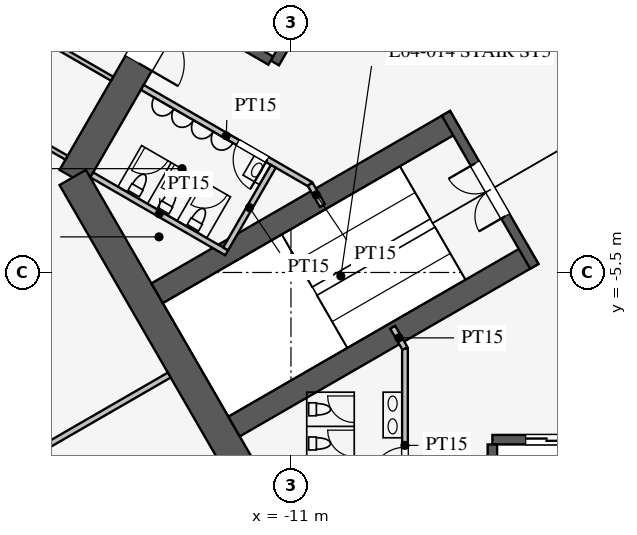
"""IFC4 building model, lengths in metres.
Left out: names, types, materials, properties, quantities, classifications, styles, units other than length and angle.
Written with IfcOpenShell. Run it as: python <this file> out.ifc"""

import sys

from ifc_helpers import new_model, si_unit, direction, frame, frame_2d, origin, place, context, subcontext, project, spatial, rectangle, extrude, element, fill, save


model = new_model("IFC4")
c1 = context("Model", 3, precision=1e-05, world=origin(), true_north=direction((0.0, 1.0)))
c2 = subcontext(c1, "Body", "Model", "MODEL_VIEW")
j1 = project(units=[si_unit("LENGTHUNIT", "METRE"), si_unit("PLANEANGLEUNIT", "RADIAN")], contexts=[c1])
p1 = place(None, origin())
s1 = spatial("IfcSite", under=j1, at=p1, CompositionType="ELEMENT")
p2 = place(p1, origin())
s2 = spatial("IfcBuilding", under=s1, at=p2, CompositionType="ELEMENT")
p3 = place(p2, frame((0.0, 0.0, 20.7)))
s3 = spatial("IfcBuildingStorey", under=s2, at=p3, CompositionType="ELEMENT", Elevation=20.7)
p4 = place(p3, frame((-5.773, 16.0, 0.0), z_axis=(0.0, 0.0, 1.0), x_axis=(-0.500002442456, -0.866023993627, 0.0)))
e1 = element("IfcWall", 1, at=p4, inside=s3, PredefinedType="SHEAR", context=c2, shape_type="SweptSolid", body=[
    extrude(rectangle(XDim=21.939, YDim=0.8, at=frame_2d((10.97, 0.0))), origin(), (0.0, 0.0, 1.0), 4.2),
])
p5 = place(p4, frame((17.27, 0.0, 0.0)))
e2 = element("IfcOpeningElement", 2, at=p5, cuts=e1, PredefinedType="OPENING", context=c2, shape_type="SweptSolid", body=[
    extrude(rectangle(XDim=1.2, YDim=2.1, at=frame_2d((0.6, 1.05))), frame((0.0, 0.41, 0.0), z_axis=(0.0, -1.0, 0.0), x_axis=(1.0, 0.0, 0.0)), (0.0, 0.0, 1.0), 0.82),
])
p6 = place(p4, frame((3.47, 0.0, 0.0)))
e3 = element("IfcOpeningElement", 3, at=p6, cuts=e1, PredefinedType="OPENING", context=c2, shape_type="SweptSolid", body=[
    extrude(rectangle(XDim=1.2, YDim=2.1, at=frame_2d((0.6, 1.05))), frame((0.0, 0.41, 0.0), z_axis=(0.0, -1.0, 0.0), x_axis=(1.0, 0.0, 0.0)), (0.0, 0.0, 1.0), 0.82),
])
p7 = place(p3, frame((-16.743, -3.0, 0.0), z_axis=(0.0, 0.0, 1.0), x_axis=(0.499995765644, -0.866027848477, 0.0)))
e4 = element("IfcWall", 4, at=p7, inside=s3, PredefinedType="SHEAR", context=c2, shape_type="SweptSolid", body=[
    extrude(rectangle(XDim=11.547, YDim=0.8, at=frame_2d((5.773, 0.0))), origin(), (0.0, 0.0, 1.0), 4.2),
])
p8 = place(p3, frame((-5.7, -9.9, 0.0), z_axis=(0.0, 0.0, 1.0), x_axis=(1.0, 0.0, 0.0)))
e5 = element("IfcWall", 5, at=p8, inside=s3, PredefinedType="SHEAR", context=c2, shape_type="SweptSolid", body=[
    extrude(rectangle(XDim=11.4, YDim=0.25, at=frame_2d((5.7, 0.0))), origin(), (0.0, 0.0, 1.0), 4.2),
])
p9 = place(p8, frame((0.875, 0.0, 0.0)))
e6 = element("IfcOpeningElement", 6, at=p9, cuts=e5, PredefinedType="OPENING", context=c2, shape_type="SweptSolid", body=[
    extrude(rectangle(XDim=1.1, YDim=2.2, at=frame_2d((0.55, 1.1))), frame((0.0, 0.135, 0.0), z_axis=(0.0, -1.0, 0.0), x_axis=(1.0, 0.0, 0.0)), (0.0, 0.0, 1.0), 0.27),
])
p10 = place(p8, frame((3.725, 0.0, 0.0)))
e7 = element("IfcOpeningElement", 7, at=p10, cuts=e5, PredefinedType="OPENING", context=c2, shape_type="SweptSolid", body=[
    extrude(rectangle(XDim=1.1, YDim=2.2, at=frame_2d((0.55, 1.1))), frame((0.0, 0.135, 0.0), z_axis=(0.0, -1.0, 0.0), x_axis=(1.0, 0.0, 0.0)), (0.0, 0.0, 1.0), 0.27),
])
p11 = place(p8, frame((6.575, 0.0, 0.0)))
e8 = element("IfcOpeningElement", 8, at=p11, cuts=e5, PredefinedType="OPENING", context=c2, shape_type="SweptSolid", body=[
    extrude(rectangle(XDim=1.1, YDim=2.2, at=frame_2d((0.55, 1.1))), frame((0.0, 0.135, 0.0), z_axis=(0.0, -1.0, 0.0), x_axis=(1.0, 0.0, 0.0)), (0.0, 0.0, 1.0), 0.27),
])
p12 = place(p8, frame((9.425, 0.0, 0.0)))
e9 = element("IfcOpeningElement", 9, at=p12, cuts=e5, PredefinedType="OPENING", context=c2, shape_type="SweptSolid", body=[
    extrude(rectangle(XDim=1.1, YDim=2.2, at=frame_2d((0.55, 1.1))), frame((0.0, 0.135, 0.0), z_axis=(0.0, -1.0, 0.0), x_axis=(1.0, 0.0, 0.0)), (0.0, 0.0, 1.0), 0.27),
])
p13 = place(p3, frame((-5.7, -10.025, 0.0), z_axis=(0.0, 0.0, 1.0), x_axis=(0.0, -1.0, 0.0)))
e10 = element("IfcWall", 10, at=p13, inside=s3, PredefinedType="SHEAR", context=c2, shape_type="SweptSolid", body=[
    extrude(rectangle(XDim=2.575, YDim=0.25, at=frame_2d((1.288, 0.0))), origin(), (0.0, 0.0, 1.0), 4.2),
])
p14 = place(p3, frame((-5.724, 9.886, 0.0), z_axis=(0.0, 0.0, 1.0), x_axis=(-0.500001763848, -0.866024385424, 0.0)))
e11 = element("IfcWall", 11, at=p14, inside=s3, PredefinedType="SHEAR", context=c2, shape_type="SweptSolid", body=[
    extrude(rectangle(XDim=11.4, YDim=0.25, at=frame_2d((5.7, 0.0))), origin(), (0.0, 0.0, 1.0), 4.2),
])
p15 = place(p14, frame((6.525, 0.0, 0.0)))
e12 = element("IfcOpeningElement", 12, at=p15, cuts=e11, PredefinedType="OPENING", context=c2, shape_type="SweptSolid", body=[
    extrude(rectangle(XDim=1.2, YDim=2.2, at=frame_2d((0.6, 1.1))), frame((0.0, 0.135, 0.0), z_axis=(0.0, -1.0, 0.0), x_axis=(1.0, 0.0, 0.0)), (0.0, 0.0, 1.0), 0.27),
])
p16 = place(p14, frame((9.375, 0.0, 0.0)))
e13 = element("IfcOpeningElement", 13, at=p16, cuts=e11, PredefinedType="OPENING", context=c2, shape_type="SweptSolid", body=[
    extrude(rectangle(XDim=1.2, YDim=2.2, at=frame_2d((0.6, 1.1))), frame((0.0, 0.135, 0.0), z_axis=(0.0, -1.0, 0.0), x_axis=(1.0, 0.0, 0.0)), (0.0, 0.0, 1.0), 0.27),
])
p17 = place(p3, frame((-11.532, 0.076, 0.0), z_axis=(0.0, 0.0, 1.0), x_axis=(-0.866005588531, 0.500034319456, 0.0)))
e14 = element("IfcWall", 14, at=p17, inside=s3, PredefinedType="SHEAR", context=c2, shape_type="SweptSolid", body=[
    extrude(rectangle(XDim=2.575, YDim=0.25, at=frame_2d((1.288, 0.0))), origin(), (0.0, 0.0, 1.0), 4.2),
])
for number, where, z_axis, x_axis in (
    (15, (-6.663, -1.509, 0.0), (0.0, 0.0, 1.0), (-0.866, -0.5, 0.0)),
    (16, (-4.638, -5.016, 0.0), (0.0, 0.0, 1.0), (-0.866, -0.5, 0.0)),
):
    element("IfcWall", number, at=place(p3, frame(where, z_axis=z_axis, x_axis=x_axis)), inside=s3, PredefinedType="SHEAR", context=c2, shape_type="SweptSolid", body=[
        extrude(rectangle(XDim=9.075, YDim=0.6, at=frame_2d((4.538, 0.0))), origin(), (0.0, 0.0, 1.0), 4.2),
    ])
p18 = place(p3, frame((-6.922, -1.312, 0.0), z_axis=(0.0, 0.0, 1.0), x_axis=(0.499984536904, -0.866034331223, 0.0)))
e17 = element("IfcWall", 17, at=p18, inside=s3, PredefinedType="SHEAR", context=c2, shape_type="SweptSolid", body=[
    extrude(rectangle(XDim=4.65, YDim=0.25, at=frame_2d((2.325, 0.0))), origin(), (0.0, 0.0, 1.0), 4.2),
])
p19 = place(p18, frame((1.525, 0.0, 0.0)))
e18 = element("IfcOpeningElement", 18, at=p19, cuts=e17, PredefinedType="OPENING", context=c2, shape_type="SweptSolid", body=[
    extrude(rectangle(XDim=1.6, YDim=2.1, at=frame_2d((0.8, 1.05))), frame((0.0, 0.135, 0.0), z_axis=(0.0, -1.0, 0.0), x_axis=(1.0, 0.0, 0.0)), (0.0, 0.0, 1.0), 0.27),
])
p20 = place(p3, frame((-8.0, -7.5, 0.0), z_axis=(0.0, 0.0, 1.0), x_axis=(0.0, -1.0, 0.0)))
e19 = element("IfcWall", 19, at=p20, inside=s3, PredefinedType="PARTITIONING", context=c2, shape_type="SweptSolid", body=[
    extrude(rectangle(XDim=5.1, YDim=0.15, at=frame_2d((2.55, 0.0))), origin(), (0.0, 0.0, 1.0), 4.0),
])
p21 = place(p20, frame((2.6, 0.0, 0.0)))
e20 = element("IfcOpeningElement", 20, at=p21, cuts=e19, PredefinedType="OPENING", context=c2, shape_type="SweptSolid", body=[
    extrude(rectangle(XDim=0.9, YDim=2.1, at=frame_2d((0.45, 1.05))), frame((0.0, 0.085, 0.0), z_axis=(0.0, -1.0, 0.0), x_axis=(1.0, 0.0, 0.0)), (0.0, 0.0, 1.0), 0.17),
])
p22 = place(p3, frame((-10.495, -3.178, 0.0), z_axis=(0.0, 0.0, 1.0), x_axis=(-0.86602216432, 0.500005610874, 0.0)))
e21 = element("IfcWall", 21, at=p22, inside=s3, PredefinedType="PARTITIONING", context=c2, shape_type="SweptSolid", body=[
    extrude(rectangle(XDim=5.1, YDim=0.15, at=frame_2d((2.55, 0.0))), origin(), (0.0, 0.0, 1.0), 4.0),
])
p23 = place(p22, frame((1.3, 0.0, 0.0)))
e22 = element("IfcOpeningElement", 22, at=p23, cuts=e21, PredefinedType="OPENING", context=c2, shape_type="SweptSolid", body=[
    extrude(rectangle(XDim=0.9, YDim=2.1, at=frame_2d((0.45, 1.05))), frame((0.0, 0.085, 0.0), z_axis=(0.0, -1.0, 0.0), x_axis=(1.0, 0.0, 0.0)), (0.0, 0.0, 1.0), 0.17),
])
for number, where, z_axis, x_axis in (
    (23, (-10.495, -3.178, 0.0), (0.0, 0.0, 1.0), (0.5, -0.866, 0.0)),
    (24, (-8.0, -7.5, 0.0), (0.0, 0.0, 1.0), (-0.5, 0.866, 0.0)),
):
    element("IfcWall", number, at=place(p3, frame(where, z_axis=z_axis, x_axis=x_axis)), inside=s3, PredefinedType="PARTITIONING", context=c2, shape_type="SweptSolid", body=[
        extrude(rectangle(XDim=0.645, YDim=0.15, at=frame_2d((0.323, 0.0))), origin(), (0.0, 0.0, 1.0), 4.0),
    ])
p24 = place(p3, frame((-12.691, -4.982, 0.0), z_axis=(0.0, 0.0, 1.0), x_axis=(-0.8660249478, 0.500000789788, 0.0)))
e25 = element("IfcWall", 25, at=p24, inside=s3, PredefinedType="PARTITIONING", context=c2, shape_type="SweptSolid", body=[
    extrude(rectangle(XDim=4.1, YDim=0.15, at=frame_2d((2.05, 0.0))), origin(), (0.0, 0.0, 1.0), 4.0),
])
p25 = place(p3, frame((-11.464, -2.706, 0.0), z_axis=(0.0, 0.0, 1.0), x_axis=(-0.50001992892, -0.866013897511, 0.0)))
e26 = element("IfcWall", 26, at=p25, inside=s3, PredefinedType="PARTITIONING", context=c2, shape_type="SweptSolid", body=[
    extrude(rectangle(XDim=2.51, YDim=0.15, at=frame_2d((1.255, 0.0))), origin(), (0.0, 0.0, 1.0), 4.0),
])
p26 = place(p3, frame((-14.203, -8.2, 0.0), z_axis=(0.0, 0.0, 1.0), x_axis=(-0.866024965723, -0.500000758745, 0.0)))
e27 = element("IfcWall", 27, at=p26, inside=s3, PredefinedType="PARTITIONING", context=c2, shape_type="SweptSolid", body=[
    extrude(rectangle(XDim=18.25, YDim=0.15, at=frame_2d((9.125, 0.0))), origin(), (0.0, 0.0, 1.0), 2.3),
])
for number, where, z_axis, x_axis in (
    (28, (-16.905, -2.48, 0.0), (0.0, 0.0, 1.0), (-0.866, 0.5, 0.0)),
    (29, (-15.705, -0.401, 0.0), (0.0, 0.0, 1.0), (-0.866, 0.5, 0.0)),
):
    element("IfcWall", number, at=place(p3, frame(where, z_axis=z_axis, x_axis=x_axis)), inside=s3, PredefinedType="PARTITIONING", context=c2, shape_type="SweptSolid", body=[
        extrude(rectangle(XDim=4.0, YDim=0.12, at=frame_2d((2.0, 0.0))), origin(), (0.0, 0.0, 1.0), 2.9),
    ])
p27 = place(p21, frame((0.9, 0.0, 0.0), z_axis=(0.0, 0.0, 1.0), x_axis=(-1.0, 0.0, 0.0)))
e30 = element("IfcDoor", 30, at=p27, inside=s3, OperationType="SINGLE_SWING_LEFT", PredefinedType="DOOR", context=c2, shape_type="SweptSolid", body=[
    extrude(rectangle(XDim=0.9, YDim=2.1, at=frame_2d((0.45, 1.05))), frame((0.0, 0.025, 0.0), z_axis=(0.0, -1.0, 0.0), x_axis=(1.0, 0.0, 0.0)), (0.0, 0.0, 1.0), 0.05),
])
fill(e20, e30)
p28 = place(p23, origin())
e31 = element("IfcDoor", 31, at=p28, inside=s3, OperationType="SINGLE_SWING_LEFT", PredefinedType="DOOR", context=c2, shape_type="SweptSolid", body=[
    extrude(rectangle(XDim=0.9, YDim=2.1, at=frame_2d((0.45, 1.05))), frame((0.0, 0.025, 0.0), z_axis=(0.0, -1.0, 0.0), x_axis=(1.0, 0.0, 0.0)), (0.0, 0.0, 1.0), 0.05),
])
fill(e22, e31)
p29 = place(p19, frame((1.6, 0.0, 0.0), z_axis=(0.0, 0.0, 1.0), x_axis=(-1.0, 0.0, 0.0)))
e32 = element("IfcDoor", 32, at=p29, inside=s3, OperationType="DOUBLE_DOOR_SINGLE_SWING", PredefinedType="DOOR", context=c2, shape_type="SweptSolid", body=[
    extrude(rectangle(XDim=1.6, YDim=2.1, at=frame_2d((0.8, 1.05))), frame((0.0, 0.025, 0.0), z_axis=(0.0, -1.0, 0.0), x_axis=(1.0, 0.0, 0.0)), (0.0, 0.0, 1.0), 0.05),
])
fill(e18, e32)
p30 = place(p5, origin())
e33 = element("IfcDoor", 33, at=p30, inside=s3, OperationType="SINGLE_SWING_RIGHT", PredefinedType="DOOR", context=c2, shape_type="SweptSolid", body=[
    extrude(rectangle(XDim=1.2, YDim=2.1, at=frame_2d((0.6, 1.05))), frame((0.0, 0.025, 0.0), z_axis=(0.0, -1.0, 0.0), x_axis=(1.0, 0.0, 0.0)), (0.0, 0.0, 1.0), 0.05),
])
fill(e2, e33)
p31 = place(p9, origin())
e34 = element("IfcDoor", 34, at=p31, inside=s3, OperationType="DOUBLE_DOOR_SLIDING", PredefinedType="DOOR", context=c2, shape_type="SweptSolid", body=[
    extrude(rectangle(XDim=1.1, YDim=2.2, at=frame_2d((0.55, 1.1))), frame((0.0, 0.025, 0.0), z_axis=(0.0, -1.0, 0.0), x_axis=(1.0, 0.0, 0.0)), (0.0, 0.0, 1.0), 0.05),
])
fill(e6, e34)
save(model, sys.argv[1])
